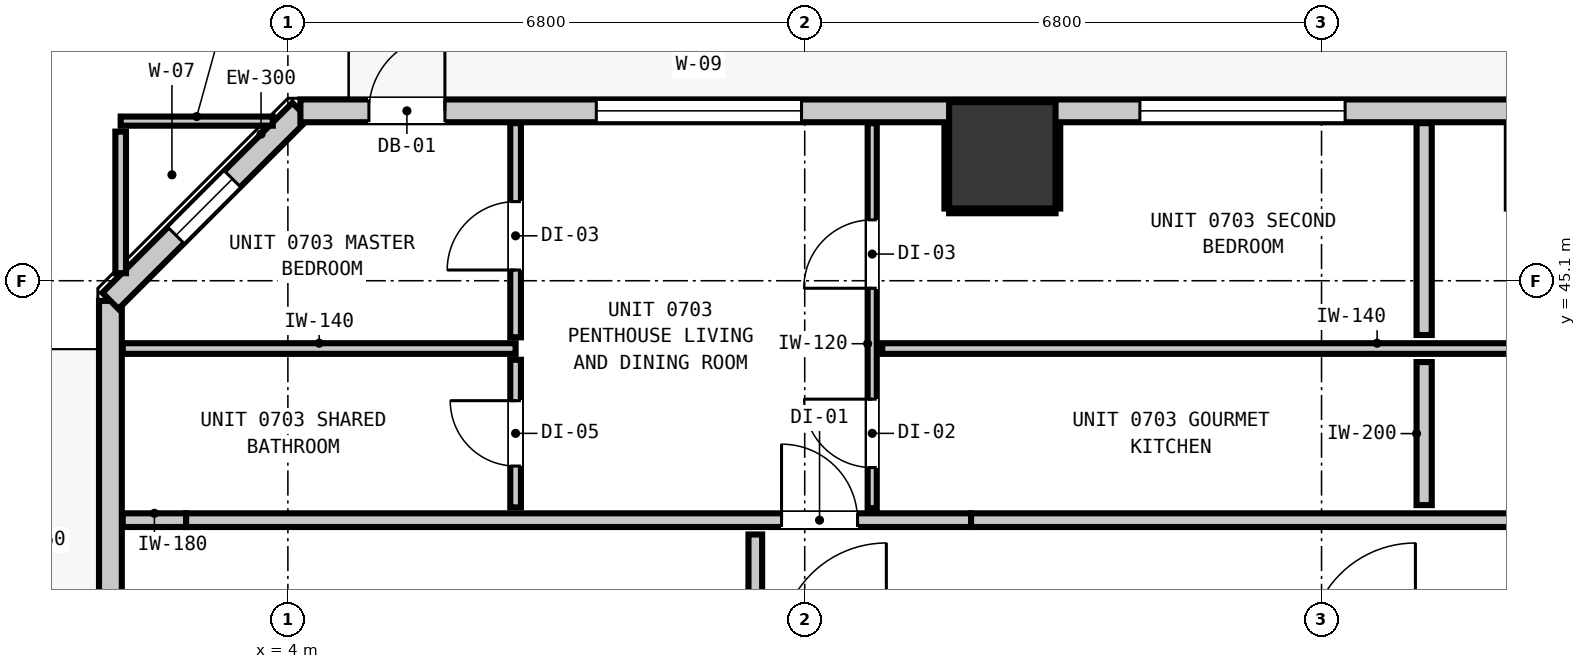
"""IFC4 building model, lengths in metres.
Left out: names, types, materials, properties, quantities, classifications, styles, units other than length and angle.
Written with IfcOpenShell. Run it as: python <this file> out.ifc"""

import sys

from ifc_helpers import new_model, si_unit, direction, frame, frame_2d, origin, origin_2d, place, context, subcontext, project, spatial, rectangle, extrude, element, fill, save


model = new_model("IFC4")
c1 = context("Model", 3, precision=1e-05, world=origin(), true_north=direction((0.0, 1.0)))
c2 = subcontext(c1, "Body", "Model", "MODEL_VIEW")
j1 = project(units=[si_unit("LENGTHUNIT", "METRE"), si_unit("PLANEANGLEUNIT", "RADIAN")], contexts=[c1])
p1 = place(None, origin())
s1 = spatial("IfcSite", under=j1, at=p1, CompositionType="ELEMENT")
p2 = place(p1, origin())
s2 = spatial("IfcBuilding", under=s1, at=p2, CompositionType="ELEMENT")
p3 = place(p2, frame((0.0, 0.0, 28.64)))
s3 = spatial("IfcBuildingStorey", under=s2, at=p3, CompositionType="ELEMENT", Elevation=28.64)
p4 = place(p3, frame((13.4, 46.75, 0.0), z_axis=(0.0, 0.0, 1.0), x_axis=(1.0, 0.0, 0.0)))
e1 = element("IfcColumn", 1, at=p4, inside=s3, PredefinedType="COLUMN", context=c2, shape_type="SweptSolid", body=[
    extrude(rectangle(XDim=1.4, YDim=1.4, at=origin_2d()), origin(), (0.0, 0.0, 1.0), 3.32),
])
p5 = place(p3, frame((1.665, 10.165, 0.0), z_axis=(0.0, 0.0, 1.0), x_axis=(0.0, 1.0, 0.0)))
e2 = element("IfcWall", 2, at=p5, inside=s3, PredefinedType="STANDARD", context=c2, shape_type="SweptSolid", body=[
    extrude(rectangle(XDim=34.67, YDim=0.3, at=frame_2d((17.335, 0.0))), origin(), (0.0, 0.0, 1.0), 3.06),
])
p6 = place(p5, frame((0.901, 0.0, 0.0)))
e3 = element("IfcOpeningElement", 3, at=p6, cuts=e2, PredefinedType="OPENING", context=c2, shape_type="SweptSolid", body=[
    extrude(rectangle(XDim=1.0, YDim=2.15, at=frame_2d((0.5, 1.075))), frame((0.0, 0.16, 0.0), z_axis=(0.0, -1.0, 0.0), x_axis=(1.0, 0.0, 0.0)), (0.0, 0.0, 1.0), 0.32),
])
p7 = place(p5, frame((17.025, 0.0, 0.85)))
e4 = element("IfcOpeningElement", 4, at=p7, cuts=e2, PredefinedType="OPENING", context=c2, shape_type="SweptSolid", body=[
    extrude(rectangle(XDim=2.7, YDim=2.0, at=frame_2d((1.35, 1.0))), frame((0.0, 0.16, 0.0), z_axis=(0.0, -1.0, 0.0), x_axis=(1.0, 0.0, 0.0)), (0.0, 0.0, 1.0), 0.32),
])
p8 = place(p5, frame((13.175, 0.0, 0.85)))
e5 = element("IfcOpeningElement", 5, at=p8, cuts=e2, PredefinedType="OPENING", context=c2, shape_type="SweptSolid", body=[
    extrude(rectangle(XDim=2.7, YDim=2.0, at=frame_2d((1.35, 1.0))), frame((0.0, 0.16, 0.0), z_axis=(0.0, -1.0, 0.0), x_axis=(1.0, 0.0, 0.0)), (0.0, 0.0, 1.0), 0.32),
])
p9 = place(p5, frame((25.195, 0.0, 0.85)))
e6 = element("IfcOpeningElement", 6, at=p9, cuts=e2, PredefinedType="OPENING", context=c2, shape_type="SweptSolid", body=[
    extrude(rectangle(XDim=2.7, YDim=2.0, at=frame_2d((1.35, 1.0))), frame((0.0, 0.16, 0.0), z_axis=(0.0, -1.0, 0.0), x_axis=(1.0, 0.0, 0.0)), (0.0, 0.0, 1.0), 0.32),
])
p10 = place(p3, frame((1.665, 44.835, 0.0), z_axis=(0.0, 0.0, 1.0), x_axis=(0.707106781187, 0.707106781187, 0.0)))
e7 = element("IfcWall", 7, at=p10, inside=s3, PredefinedType="STANDARD", context=c2, shape_type="SweptSolid", body=[
    extrude(rectangle(XDim=3.536, YDim=0.3, at=frame_2d((1.768, 0.0))), origin(), (0.0, 0.0, 1.0), 3.06),
])
p11 = place(p10, frame((1.22, 0.0, 0.85)))
e8 = element("IfcOpeningElement", 8, at=p11, cuts=e7, PredefinedType="OPENING", context=c2, shape_type="SweptSolid", body=[
    extrude(rectangle(XDim=1.05, YDim=1.65, at=frame_2d((0.525, 0.825))), frame((0.0, 0.16, 0.0), z_axis=(0.0, -1.0, 0.0), x_axis=(1.0, 0.0, 0.0)), (0.0, 0.0, 1.0), 0.32),
])
p12 = place(p3, frame((4.165, 47.335, 0.0), z_axis=(0.0, 0.0, 1.0), x_axis=(1.0, 0.0, 0.0)))
e9 = element("IfcWall", 9, at=p12, inside=s3, PredefinedType="STANDARD", context=c2, shape_type="SweptSolid", body=[
    extrude(rectangle(XDim=37.47, YDim=0.3, at=frame_2d((18.735, 0.0))), origin(), (0.0, 0.0, 1.0), 3.06),
])
p13 = place(p12, frame((0.901, 0.0, 0.0)))
e10 = element("IfcOpeningElement", 10, at=p13, cuts=e9, PredefinedType="OPENING", context=c2, shape_type="SweptSolid", body=[
    extrude(rectangle(XDim=1.0, YDim=2.15, at=frame_2d((0.5, 1.075))), frame((0.0, 0.16, 0.0), z_axis=(0.0, -1.0, 0.0), x_axis=(1.0, 0.0, 0.0)), (0.0, 0.0, 1.0), 0.32),
])
p14 = place(p12, frame((3.893, 0.0, 0.85)))
e11 = element("IfcOpeningElement", 11, at=p14, cuts=e9, PredefinedType="OPENING", context=c2, shape_type="SweptSolid", body=[
    extrude(rectangle(XDim=2.7, YDim=2.0, at=frame_2d((1.35, 1.0))), frame((0.0, 0.16, 0.0), z_axis=(0.0, -1.0, 0.0), x_axis=(1.0, 0.0, 0.0)), (0.0, 0.0, 1.0), 0.32),
])
p15 = place(p12, frame((11.045, 0.0, 0.85)))
e12 = element("IfcOpeningElement", 12, at=p15, cuts=e9, PredefinedType="OPENING", context=c2, shape_type="SweptSolid", body=[
    extrude(rectangle(XDim=2.7, YDim=2.0, at=frame_2d((1.35, 1.0))), frame((0.0, 0.16, 0.0), z_axis=(0.0, -1.0, 0.0), x_axis=(1.0, 0.0, 0.0)), (0.0, 0.0, 1.0), 0.32),
])
p16 = place(p12, frame((21.206, 0.0, 0.85)))
e13 = element("IfcOpeningElement", 13, at=p16, cuts=e9, PredefinedType="OPENING", context=c2, shape_type="SweptSolid", body=[
    extrude(rectangle(XDim=2.7, YDim=2.0, at=frame_2d((1.35, 1.0))), frame((0.0, 0.16, 0.0), z_axis=(0.0, -1.0, 0.0), x_axis=(1.0, 0.0, 0.0)), (0.0, 0.0, 1.0), 0.32),
])
p17 = place(p12, frame((17.606, 0.0, 0.85)))
e14 = element("IfcOpeningElement", 14, at=p17, cuts=e9, PredefinedType="OPENING", context=c2, shape_type="SweptSolid", body=[
    extrude(rectangle(XDim=2.7, YDim=2.0, at=frame_2d((1.35, 1.0))), frame((0.0, 0.16, 0.0), z_axis=(0.0, -1.0, 0.0), x_axis=(1.0, 0.0, 0.0)), (0.0, 0.0, 1.0), 0.32),
])
p18 = place(p12, frame((28.588, 0.0, 0.85)))
e15 = element("IfcOpeningElement", 15, at=p18, cuts=e9, PredefinedType="OPENING", context=c2, shape_type="SweptSolid", body=[
    extrude(rectangle(XDim=2.7, YDim=2.0, at=frame_2d((1.35, 1.0))), frame((0.0, 0.16, 0.0), z_axis=(0.0, -1.0, 0.0), x_axis=(1.0, 0.0, 0.0)), (0.0, 0.0, 1.0), 0.32),
])
p19 = place(p12, frame((35.56, 0.0, 0.85)))
e16 = element("IfcOpeningElement", 16, at=p19, cuts=e9, PredefinedType="OPENING", context=c2, shape_type="SweptSolid", body=[
    extrude(rectangle(XDim=1.05, YDim=1.65, at=frame_2d((0.525, 0.825))), frame((0.0, 0.16, 0.0), z_axis=(0.0, -1.0, 0.0), x_axis=(1.0, 0.0, 0.0)), (0.0, 0.0, 1.0), 0.32),
])
p20 = place(p3, frame((1.827, 41.95, 0.0), z_axis=(0.0, 0.0, 1.0), x_axis=(1.0, 0.0, 0.0)))
e17 = element("IfcWall", 17, at=p20, inside=s3, PredefinedType="PARTITIONING", context=c2, shape_type="SweptSolid", body=[
    extrude(rectangle(XDim=0.834, YDim=0.18, at=frame_2d((0.417, 0.0))), origin(), (0.0, 0.0, 1.0), 3.06),
])
p21 = place(p3, frame((2.661, 41.95, 0.0), z_axis=(0.0, 0.0, 1.0), x_axis=(1.0, 0.0, 0.0)))
e18 = element("IfcWall", 18, at=p21, inside=s3, PredefinedType="PARTITIONING", context=c2, shape_type="SweptSolid", body=[
    extrude(rectangle(XDim=10.328, YDim=0.18, at=frame_2d((5.164, 0.0))), origin(), (0.0, 0.0, 1.0), 2.445),
])
p22 = place(p21, frame((7.834, 0.0, 0.0)))
e19 = element("IfcOpeningElement", 19, at=p22, cuts=e18, PredefinedType="OPENING", context=c2, shape_type="SweptSolid", body=[
    extrude(rectangle(XDim=1.0, YDim=2.15, at=frame_2d((0.5, 1.075))), frame((0.0, 0.1, 0.0), z_axis=(0.0, -1.0, 0.0), x_axis=(1.0, 0.0, 0.0)), (0.0, 0.0, 1.0), 0.2),
])
p23 = place(p3, frame((12.989, 41.95, 0.0), z_axis=(0.0, 0.0, 1.0), x_axis=(1.0, 0.0, 0.0)))
e20 = element("IfcWall", 20, at=p23, inside=s3, PredefinedType="PARTITIONING", context=c2, shape_type="SweptSolid", body=[
    extrude(rectangle(XDim=30.984, YDim=0.18, at=frame_2d((15.492, 0.0))), origin(), (0.0, 0.0, 1.0), 3.06),
])
p24 = place(p23, frame((14.765, 0.0, 0.0)))
e21 = element("IfcOpeningElement", 21, at=p24, cuts=e20, PredefinedType="OPENING", context=c2, shape_type="SweptSolid", body=[
    extrude(rectangle(XDim=1.0, YDim=2.15, at=frame_2d((0.5, 1.075))), frame((0.0, 0.1, 0.0), z_axis=(0.0, -1.0, 0.0), x_axis=(1.0, 0.0, 0.0)), (0.0, 0.0, 1.0), 0.2),
])
p25 = place(p3, frame((1.827, 44.208, 0.0), z_axis=(0.0, 0.0, 1.0), x_axis=(1.0, 0.0, 0.0)))
e22 = element("IfcWall", 22, at=p25, inside=s3, PredefinedType="PARTITIONING", context=c2, shape_type="SweptSolid", body=[
    extrude(rectangle(XDim=5.169, YDim=0.14, at=frame_2d((2.584, 0.0))), origin(), (0.0, 0.0, 1.0), 3.06),
])
p26 = place(p3, frame((11.82, 44.208, 0.0), z_axis=(0.0, 0.0, 1.0), x_axis=(1.0, 0.0, 0.0)))
e23 = element("IfcWall", 23, at=p26, inside=s3, PredefinedType="PARTITIONING", context=c2, shape_type="SweptSolid", body=[
    extrude(rectangle(XDim=13.022, YDim=0.14, at=frame_2d((6.511, 0.0))), origin(), (0.0, 0.0, 1.0), 3.06),
])
p27 = place(p3, frame((1.8, 47.2, 0.0), z_axis=(0.0, 0.0, 1.0), x_axis=(1.0, 0.0, 0.0)))
e24 = element("IfcWall", 24, at=p27, inside=s3, PredefinedType="PARTITIONING", context=c2, shape_type="SweptSolid", body=[
    extrude(rectangle(XDim=2.001, YDim=0.12, at=frame_2d((1.0, 0.0))), origin(), (0.0, 0.0, 1.0), 3.06),
])
p28 = place(p3, frame((18.95, 42.148, 0.0), z_axis=(0.0, 0.0, 1.0), x_axis=(0.0, 1.0, 0.0)))
e25 = element("IfcWall", 25, at=p28, inside=s3, PredefinedType="PARTITIONING", context=c2, shape_type="SweptSolid", body=[
    extrude(rectangle(XDim=1.882, YDim=0.2, at=frame_2d((0.941, 0.0))), origin(), (0.0, 0.0, 1.0), 3.06),
])
p29 = place(p3, frame((18.95, 44.386, 0.0), z_axis=(0.0, 0.0, 1.0), x_axis=(0.0, 1.0, 0.0)))
e26 = element("IfcWall", 26, at=p29, inside=s3, PredefinedType="PARTITIONING", context=c2, shape_type="SweptSolid", body=[
    extrude(rectangle(XDim=2.787, YDim=0.2, at=frame_2d((1.394, 0.0))), origin(), (0.0, 0.0, 1.0), 3.06),
])
p30 = place(p3, frame((10.15, 40.438, 0.0), z_axis=(0.0, 0.0, 1.0), x_axis=(0.0, 1.0, 0.0)))
e27 = element("IfcWall", 27, at=p30, inside=s3, PredefinedType="PARTITIONING", context=c2, shape_type="SweptSolid", body=[
    extrude(rectangle(XDim=1.324, YDim=0.18, at=frame_2d((0.662, 0.0))), origin(), (0.0, 0.0, 1.0), 3.06),
])
p31 = place(p3, frame((1.8, 45.199, 0.0), z_axis=(0.0, 0.0, 1.0), x_axis=(0.0, 1.0, 0.0)))
e28 = element("IfcWall", 28, at=p31, inside=s3, PredefinedType="PARTITIONING", context=c2, shape_type="SweptSolid", body=[
    extrude(rectangle(XDim=1.863, YDim=0.14, at=frame_2d((0.932, 0.0))), origin(), (0.0, 0.0, 1.0), 3.06),
])
p32 = place(p3, frame((6.996, 42.118, 0.0), z_axis=(0.0, 0.0, 1.0), x_axis=(0.0, 1.0, 0.0)))
e29 = element("IfcWall", 29, at=p32, inside=s3, PredefinedType="PARTITIONING", context=c2, shape_type="SweptSolid", body=[
    extrude(rectangle(XDim=1.942, YDim=0.14, at=frame_2d((0.971, 0.0))), origin(), (0.0, 0.0, 1.0), 3.06),
])
p33 = place(p32, frame((0.544, 0.0, 0.0)))
e30 = element("IfcOpeningElement", 30, at=p33, cuts=e29, PredefinedType="OPENING", context=c2, shape_type="SweptSolid", body=[
    extrude(rectangle(XDim=0.86, YDim=2.02, at=frame_2d((0.43, 1.01))), frame((0.0, 0.08, 0.0), z_axis=(0.0, -1.0, 0.0), x_axis=(1.0, 0.0, 0.0)), (0.0, 0.0, 1.0), 0.16),
])
p34 = place(p3, frame((6.996, 44.356, 0.0), z_axis=(0.0, 0.0, 1.0), x_axis=(0.0, 1.0, 0.0)))
e31 = element("IfcWall", 31, at=p34, inside=s3, PredefinedType="PARTITIONING", context=c2, shape_type="SweptSolid", body=[
    extrude(rectangle(XDim=2.817, YDim=0.14, at=frame_2d((1.409, 0.0))), origin(), (0.0, 0.0, 1.0), 3.06),
])
p35 = place(p34, frame((0.885, 0.0, 0.0)))
e32 = element("IfcOpeningElement", 32, at=p35, cuts=e31, PredefinedType="OPENING", context=c2, shape_type="SweptSolid", body=[
    extrude(rectangle(XDim=0.9, YDim=2.1, at=frame_2d((0.45, 1.05))), frame((0.0, 0.08, 0.0), z_axis=(0.0, -1.0, 0.0), x_axis=(1.0, 0.0, 0.0)), (0.0, 0.0, 1.0), 0.16),
])
p36 = place(p3, frame((11.688, 42.108, 0.0), z_axis=(0.0, 0.0, 1.0), x_axis=(0.0, 1.0, 0.0)))
e33 = element("IfcWall", 33, at=p36, inside=s3, PredefinedType="PARTITIONING", context=c2, shape_type="SweptSolid", body=[
    extrude(rectangle(XDim=5.065, YDim=0.12, at=frame_2d((2.533, 0.0))), origin(), (0.0, 0.0, 1.0), 3.06),
])
p37 = place(p36, frame((0.534, 0.0, 0.0)))
e34 = element("IfcOpeningElement", 34, at=p37, cuts=e33, PredefinedType="OPENING", context=c2, shape_type="SweptSolid", body=[
    extrude(rectangle(XDim=0.9, YDim=2.1, at=frame_2d((0.45, 1.05))), frame((0.0, 0.07, 0.0), z_axis=(0.0, -1.0, 0.0), x_axis=(1.0, 0.0, 0.0)), (0.0, 0.0, 1.0), 0.14),
])
p38 = place(p36, frame((2.893, 0.0, 0.0)))
e35 = element("IfcOpeningElement", 35, at=p38, cuts=e33, PredefinedType="OPENING", context=c2, shape_type="SweptSolid", body=[
    extrude(rectangle(XDim=0.9, YDim=2.1, at=frame_2d((0.45, 1.05))), frame((0.0, 0.07, 0.0), z_axis=(0.0, -1.0, 0.0), x_axis=(1.0, 0.0, 0.0)), (0.0, 0.0, 1.0), 0.14),
])
p39 = place(p3, frame((12.7, 46.018, 0.0), z_axis=(0.0, 0.0, 1.0), x_axis=(1.0, 0.0, 0.0)))
e36 = element("IfcWall", 36, at=p39, inside=s3, PredefinedType="PARTITIONING", context=c2, shape_type="SweptSolid", body=[
    extrude(rectangle(XDim=1.4, YDim=0.06, at=frame_2d((0.7, 0.0))), origin(), (0.0, 0.0, 1.0), 1.45),
])
for number, where, z_axis, x_axis in (
    (37, (12.668, 46.05, 0.0), (0.0, 0.0, 1.0), (0.0, 1.0, 0.0)),
    (38, (14.132, 46.05, 0.0), (0.0, 0.0, 1.0), (0.0, 1.0, 0.0)),
):
    element("IfcWall", number, at=place(p3, frame(where, z_axis=z_axis, x_axis=x_axis)), inside=s3, PredefinedType="PARTITIONING", context=c2, shape_type="SweptSolid", body=[
        extrude(rectangle(XDim=1.12, YDim=0.06, at=frame_2d((0.56, 0.0))), origin(), (0.0, 0.0, 1.0), 1.45),
    ])
p40 = place(p13, origin())
e39 = element("IfcDoor", 39, at=p40, inside=s3, OperationType="SINGLE_SWING_RIGHT", PredefinedType="DOOR", context=c2, shape_type="SweptSolid", body=[
    extrude(rectangle(XDim=1.0, YDim=2.15, at=frame_2d((0.5, 1.075))), frame((0.0, 0.025, 0.0), z_axis=(0.0, -1.0, 0.0), x_axis=(1.0, 0.0, 0.0)), (0.0, 0.0, 1.0), 0.05),
])
fill(e10, e39)
p41 = place(p14, origin())
e40 = element("IfcWindow", 40, at=p41, inside=s3, PartitioningType="SINGLE_PANEL", PredefinedType="WINDOW", context=c2, shape_type="SweptSolid", body=[
    extrude(rectangle(XDim=2.7, YDim=2.0, at=frame_2d((1.35, 1.0))), frame((0.0, 0.03, 0.0), z_axis=(0.0, -1.0, 0.0), x_axis=(1.0, 0.0, 0.0)), (0.0, 0.0, 1.0), 0.06),
])
fill(e11, e40)
p42 = place(p15, origin())
e41 = element("IfcWindow", 41, at=p42, inside=s3, PartitioningType="SINGLE_PANEL", PredefinedType="WINDOW", context=c2, shape_type="SweptSolid", body=[
    extrude(rectangle(XDim=2.7, YDim=2.0, at=frame_2d((1.35, 1.0))), frame((0.0, 0.03, 0.0), z_axis=(0.0, -1.0, 0.0), x_axis=(1.0, 0.0, 0.0)), (0.0, 0.0, 1.0), 0.06),
])
fill(e12, e41)
p43 = place(p11, origin())
e42 = element("IfcWindow", 42, at=p43, inside=s3, PartitioningType="SINGLE_PANEL", PredefinedType="WINDOW", context=c2, shape_type="SweptSolid", body=[
    extrude(rectangle(XDim=1.05, YDim=1.65, at=frame_2d((0.525, 0.825))), frame((0.0, 0.03, 0.0), z_axis=(0.0, -1.0, 0.0), x_axis=(1.0, 0.0, 0.0)), (0.0, 0.0, 1.0), 0.06),
])
fill(e8, e42)
p44 = place(p22, origin())
e43 = element("IfcDoor", 43, at=p44, inside=s3, OperationType="SINGLE_SWING_LEFT", PredefinedType="DOOR", context=c2, shape_type="SweptSolid", body=[
    extrude(rectangle(XDim=1.0, YDim=2.15, at=frame_2d((0.5, 1.075))), frame((0.0, 0.025, 0.0), z_axis=(0.0, -1.0, 0.0), x_axis=(1.0, 0.0, 0.0)), (0.0, 0.0, 1.0), 0.05),
])
fill(e19, e43)
p45 = place(p33, origin())
e44 = element("IfcDoor", 44, at=p45, inside=s3, OperationType="SINGLE_SWING_RIGHT", PredefinedType="DOOR", context=c2, shape_type="SweptSolid", body=[
    extrude(rectangle(XDim=0.86, YDim=2.02, at=frame_2d((0.43, 1.01))), frame((0.0, 0.025, 0.0), z_axis=(0.0, -1.0, 0.0), x_axis=(1.0, 0.0, 0.0)), (0.0, 0.0, 1.0), 0.05),
])
fill(e30, e44)
p46 = place(p35, origin())
e45 = element("IfcDoor", 45, at=p46, inside=s3, OperationType="SINGLE_SWING_LEFT", PredefinedType="DOOR", context=c2, shape_type="SweptSolid", body=[
    extrude(rectangle(XDim=0.9, YDim=2.1, at=frame_2d((0.45, 1.05))), frame((0.0, 0.025, 0.0), z_axis=(0.0, -1.0, 0.0), x_axis=(1.0, 0.0, 0.0)), (0.0, 0.0, 1.0), 0.05),
])
fill(e32, e45)
p47 = place(p37, origin())
e46 = element("IfcDoor", 46, at=p47, inside=s3, OperationType="SINGLE_SWING_RIGHT", PredefinedType="DOOR", context=c2, shape_type="SweptSolid", body=[
    extrude(rectangle(XDim=0.9, YDim=2.1, at=frame_2d((0.45, 1.05))), frame((0.0, 0.025, 0.0), z_axis=(0.0, -1.0, 0.0), x_axis=(1.0, 0.0, 0.0)), (0.0, 0.0, 1.0), 0.05),
])
fill(e34, e46)
p48 = place(p38, origin())
e47 = element("IfcDoor", 47, at=p48, inside=s3, OperationType="SINGLE_SWING_LEFT", PredefinedType="DOOR", context=c2, shape_type="SweptSolid", body=[
    extrude(rectangle(XDim=0.9, YDim=2.1, at=frame_2d((0.45, 1.05))), frame((0.0, 0.025, 0.0), z_axis=(0.0, -1.0, 0.0), x_axis=(1.0, 0.0, 0.0)), (0.0, 0.0, 1.0), 0.05),
])
fill(e35, e47)
save(model, sys.argv[1])
